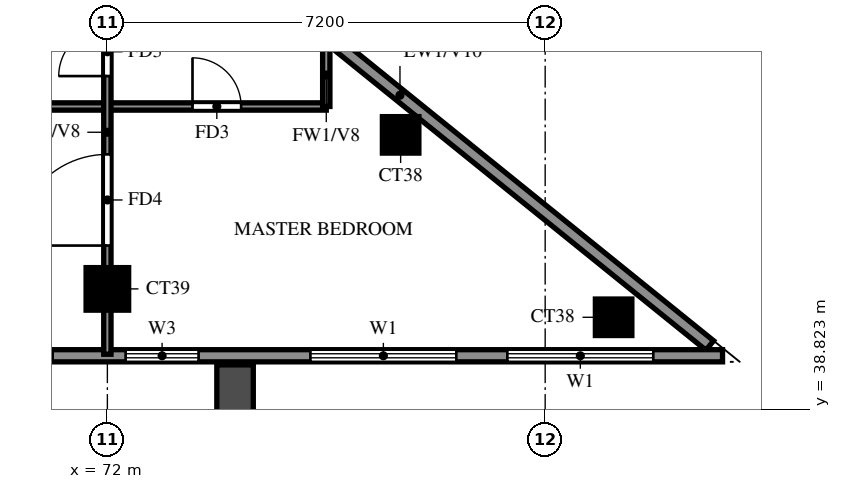
"""IFC4 building model, lengths in metres.
Left out: names, types, materials, properties, quantities, classifications, styles, units other than length and angle.
Written with IfcOpenShell. Run it as: python <this file> out.ifc"""

import sys

from ifc_helpers import new_model, si_unit, direction, frame, frame_2d, origin, origin_2d, place, context, subcontext, project, spatial, rectangle, extrude, source, transform, mapped, element, fill, save


model = new_model("IFC4")
c1 = context("Model", 3, precision=1e-05, world=origin(), true_north=direction((0.0, 1.0)))
c2 = subcontext(c1, "Body", "Model", "MODEL_VIEW")
j1 = project(units=[si_unit("LENGTHUNIT", "METRE"), si_unit("PLANEANGLEUNIT", "RADIAN")], contexts=[c1])
p1 = place(None, origin())
s1 = spatial("IfcSite", under=j1, at=p1, CompositionType="ELEMENT")
p2 = place(p1, origin())
s2 = spatial("IfcBuilding", under=s1, at=p2, CompositionType="ELEMENT")
p3 = place(p2, frame((0.0, 0.0, 267.5)))
s3 = spatial("IfcBuildingStorey", under=s2, at=p3, CompositionType="ELEMENT", Elevation=267.5)
m1 = source(origin(), c2, "Body", "SweptSolid", [
    extrude(rectangle(XDim=0.6, YDim=0.6, at=origin_2d()), origin(), (0.0, 0.0, 1.0), 3.099),
])
p4 = place(p3, frame((80.326, 40.333, 0.0), z_axis=(0.0, 0.0, 1.0), x_axis=(1.0, 0.0, 0.0)))
e1 = element("IfcColumn", 1, at=p4, inside=s3, PredefinedType="COLUMN", context=c2, shape_type="MappedRepresentation", body=[
    mapped(m1, transform((0.0, 0.0, 0.0))),
])
m2 = source(origin(), c2, "Body", "SweptSolid", [
    extrude(rectangle(XDim=0.7, YDim=0.7, at=origin_2d()), origin(), (0.0, 0.0, 1.0), 3.099),
])
p5 = place(p3, frame((72.0, 40.8, 0.0), z_axis=(0.0, 0.0, 1.0), x_axis=(1.0, 0.0, 0.0)))
e2 = element("IfcColumn", 2, at=p5, inside=s3, PredefinedType="COLUMN", context=c2, shape_type="MappedRepresentation", body=[
    mapped(m2, transform((0.0, 0.0, 0.0))),
])
p6 = place(p3, frame((76.823, 43.333, 0.0), z_axis=(0.0, 0.0, 1.0), x_axis=(1.0, 0.0, 0.0)))
e3 = element("IfcColumn", 3, at=p6, inside=s3, PredefinedType="COLUMN", context=c2, shape_type="MappedRepresentation", body=[
    mapped(m1, transform((0.0, 0.0, 0.0))),
])
p7 = place(p3, frame((81.907, 39.87, 0.0), z_axis=(0.0, 0.0, 1.0), x_axis=(-0.777936274417, 0.62834318087, 0.0)))
e4 = element("IfcWall", 4, at=p7, inside=s3, PredefinedType="SOLIDWALL", context=c2, shape_type="SweptSolid", body=[
    extrude(rectangle(XDim=13.099, YDim=0.2, at=frame_2d((6.549, 0.0))), origin(), (0.0, 0.0, 1.0), 3.099),
])
p8 = place(p7, frame((9.938, 0.0, 1.5)))
e5 = element("IfcOpeningElement", 5, at=p8, cuts=e4, PredefinedType="OPENING", context=c2, shape_type="SweptSolid", body=[
    extrude(rectangle(XDim=0.9, YDim=0.9, at=frame_2d((0.45, 0.45))), frame((0.0, 0.11, 0.0), z_axis=(0.0, -1.0, 0.0), x_axis=(1.0, 0.0, 0.0)), (0.0, 0.0, 1.0), 0.22),
])
p9 = place(p3, frame((58.8, 39.7, 0.0), z_axis=(0.0, 0.0, 1.0), x_axis=(1.0, 0.0, 0.0)))
e6 = element("IfcWall", 6, at=p9, inside=s3, PredefinedType="SOLIDWALL", context=c2, shape_type="SweptSolid", body=[
    extrude(rectangle(XDim=23.317, YDim=0.2, at=frame_2d((11.658, 0.0))), origin(), (0.0, 0.0, 1.0), 3.099),
])
p10 = place(p9, frame((10.5, 0.0, 0.0)))
e7 = element("IfcOpeningElement", 7, at=p10, cuts=e6, PredefinedType="OPENING", context=c2, shape_type="SweptSolid", body=[
    extrude(rectangle(XDim=1.8, YDim=2.4, at=frame_2d((0.9, 1.2))), frame((0.0, 0.11, 0.0), z_axis=(0.0, -1.0, 0.0), x_axis=(1.0, 0.0, 0.0)), (0.0, 0.0, 1.0), 0.22),
])
p11 = place(p9, frame((6.3, 0.0, 0.6)))
e8 = element("IfcOpeningElement", 8, at=p11, cuts=e6, PredefinedType="OPENING", context=c2, shape_type="SweptSolid", body=[
    extrude(rectangle(XDim=1.8, YDim=2.4, at=frame_2d((0.9, 1.2))), frame((0.0, 0.11, 0.0), z_axis=(0.0, -1.0, 0.0), x_axis=(1.0, 0.0, 0.0)), (0.0, 0.0, 1.0), 0.22),
])
p12 = place(p9, frame((9.15, 0.0, 0.6)))
e9 = element("IfcOpeningElement", 9, at=p12, cuts=e6, PredefinedType="OPENING", context=c2, shape_type="SweptSolid", body=[
    extrude(rectangle(XDim=0.9, YDim=2.4, at=frame_2d((0.45, 1.2))), frame((0.0, 0.11, 0.0), z_axis=(0.0, -1.0, 0.0), x_axis=(1.0, 0.0, 0.0)), (0.0, 0.0, 1.0), 0.22),
])
p13 = place(p9, frame((13.5, 0.0, 0.6)))
e10 = element("IfcOpeningElement", 10, at=p13, cuts=e6, PredefinedType="OPENING", context=c2, shape_type="SweptSolid", body=[
    extrude(rectangle(XDim=1.2, YDim=2.4, at=frame_2d((0.6, 1.2))), frame((0.0, 0.11, 0.0), z_axis=(0.0, -1.0, 0.0), x_axis=(1.0, 0.0, 0.0)), (0.0, 0.0, 1.0), 0.22),
])
p14 = place(p9, frame((16.539, 0.0, 0.6)))
e11 = element("IfcOpeningElement", 11, at=p14, cuts=e6, PredefinedType="OPENING", context=c2, shape_type="SweptSolid", body=[
    extrude(rectangle(XDim=2.4, YDim=2.4, at=frame_2d((1.2, 1.2))), frame((0.0, 0.11, 0.0), z_axis=(0.0, -1.0, 0.0), x_axis=(1.0, 0.0, 0.0)), (0.0, 0.0, 1.0), 0.22),
])
p15 = place(p9, frame((19.778, 0.0, 0.6)))
e12 = element("IfcOpeningElement", 12, at=p15, cuts=e6, PredefinedType="OPENING", context=c2, shape_type="SweptSolid", body=[
    extrude(rectangle(XDim=2.4, YDim=2.4, at=frame_2d((1.2, 1.2))), frame((0.0, 0.11, 0.0), z_axis=(0.0, -1.0, 0.0), x_axis=(1.0, 0.0, 0.0)), (0.0, 0.0, 1.0), 0.22),
])
p16 = place(p3, frame((74.1, 39.55, 0.0), z_axis=(0.0, 0.0, 1.0), x_axis=(0.0, -1.0, 0.0)))
e13 = element("IfcWall", 13, at=p16, inside=s3, PredefinedType="SOLIDWALL", context=c2, shape_type="SweptSolid", body=[
    extrude(rectangle(XDim=2.65, YDim=0.6, at=frame_2d((1.325, 0.0))), origin(), (0.0, 0.0, 1.0), 2.729),
])
p17 = place(p3, frame((60.0, 43.8, 0.0), z_axis=(0.0, 0.0, 1.0), x_axis=(1.0, 0.0, 0.0)))
e14 = element("IfcWall", 14, at=p17, inside=s3, PredefinedType="PARTITIONING", context=c2, shape_type="SweptSolid", body=[
    extrude(rectangle(XDim=15.6, YDim=0.12, at=frame_2d((7.8, 0.0))), origin(), (0.0, 0.0, 1.0), 3.099),
])
p18 = place(p17, frame((7.65, 0.0, 0.0)))
e15 = element("IfcOpeningElement", 15, at=p18, cuts=e14, PredefinedType="OPENING", context=c2, shape_type="SweptSolid", body=[
    extrude(rectangle(XDim=1.5, YDim=2.1, at=frame_2d((0.75, 1.05))), frame((0.0, 0.07, 0.0), z_axis=(0.0, -1.0, 0.0), x_axis=(1.0, 0.0, 0.0)), (0.0, 0.0, 1.0), 0.14),
])
p19 = place(p17, frame((1.95, 0.0, 0.0)))
e16 = element("IfcOpeningElement", 16, at=p19, cuts=e14, PredefinedType="OPENING", context=c2, shape_type="SweptSolid", body=[
    extrude(rectangle(XDim=0.9, YDim=2.1, at=frame_2d((0.45, 1.05))), frame((0.0, 0.07, 0.0), z_axis=(0.0, -1.0, 0.0), x_axis=(1.0, 0.0, 0.0)), (0.0, 0.0, 1.0), 0.14),
])
p20 = place(p17, frame((13.4, 0.0, 0.0)))
e17 = element("IfcOpeningElement", 17, at=p20, cuts=e14, PredefinedType="OPENING", context=c2, shape_type="SweptSolid", body=[
    extrude(rectangle(XDim=0.8, YDim=2.1, at=frame_2d((0.4, 1.05))), frame((0.0, 0.07, 0.0), z_axis=(0.0, -1.0, 0.0), x_axis=(1.0, 0.0, 0.0)), (0.0, 0.0, 1.0), 0.14),
])
p21 = place(p3, frame((72.0, 39.725, 0.0), z_axis=(0.0, 0.0, 1.0), x_axis=(0.0, 1.0, 0.0)))
e18 = element("IfcWall", 18, at=p21, inside=s3, PredefinedType="PARTITIONING", context=c2, shape_type="SweptSolid", body=[
    extrude(rectangle(XDim=8.114, YDim=0.12, at=frame_2d((4.057, 0.0))), origin(), (0.0, 0.0, 1.0), 3.099),
])
p22 = place(p21, frame((1.788, 0.0, 0.0)))
e19 = element("IfcOpeningElement", 19, at=p22, cuts=e18, PredefinedType="OPENING", context=c2, shape_type="SweptSolid", body=[
    extrude(rectangle(XDim=1.5, YDim=2.1, at=frame_2d((0.75, 1.05))), frame((0.0, 0.07, 0.0), z_axis=(0.0, -1.0, 0.0), x_axis=(1.0, 0.0, 0.0)), (0.0, 0.0, 1.0), 0.14),
])
p23 = place(p21, frame((4.575, 0.0, 0.0)))
e20 = element("IfcOpeningElement", 20, at=p23, cuts=e18, PredefinedType="OPENING", context=c2, shape_type="SweptSolid", body=[
    extrude(rectangle(XDim=0.8, YDim=2.1, at=frame_2d((0.4, 1.05))), frame((0.0, 0.07, 0.0), z_axis=(0.0, -1.0, 0.0), x_axis=(1.0, 0.0, 0.0)), (0.0, 0.0, 1.0), 0.14),
])
p24 = place(p3, frame((75.6, 43.8, 0.0), z_axis=(0.0, 0.0, 1.0), x_axis=(0.0, 1.0, 0.0)))
e21 = element("IfcWall", 21, at=p24, inside=s3, PredefinedType="PARTITIONING", context=c2, shape_type="SweptSolid", body=[
    extrude(rectangle(XDim=1.035, YDim=0.12, at=frame_2d((0.518, 0.0))), origin(), (0.0, 0.0, 1.0), 3.099),
])
p25 = place(p13, origin())
e22 = element("IfcWindow", 22, at=p25, inside=s3, PartitioningType="SINGLE_PANEL", PredefinedType="WINDOW", context=c2, shape_type="SweptSolid", body=[
    extrude(rectangle(XDim=1.2, YDim=2.4, at=frame_2d((0.6, 1.2))), frame((0.0, 0.03, 0.0), z_axis=(0.0, -1.0, 0.0), x_axis=(1.0, 0.0, 0.0)), (0.0, 0.0, 1.0), 0.06),
])
fill(e10, e22)
p26 = place(p14, origin())
e23 = element("IfcWindow", 23, at=p26, inside=s3, PartitioningType="DOUBLE_PANEL_VERTICAL", PredefinedType="WINDOW", context=c2, shape_type="SweptSolid", body=[
    extrude(rectangle(XDim=2.4, YDim=2.4, at=frame_2d((1.2, 1.2))), frame((0.0, 0.03, 0.0), z_axis=(0.0, -1.0, 0.0), x_axis=(1.0, 0.0, 0.0)), (0.0, 0.0, 1.0), 0.06),
])
fill(e11, e23)
p27 = place(p15, origin())
e24 = element("IfcWindow", 24, at=p27, inside=s3, PartitioningType="DOUBLE_PANEL_VERTICAL", PredefinedType="WINDOW", context=c2, shape_type="SweptSolid", body=[
    extrude(rectangle(XDim=2.4, YDim=2.4, at=frame_2d((1.2, 1.2))), frame((0.0, 0.03, 0.0), z_axis=(0.0, -1.0, 0.0), x_axis=(1.0, 0.0, 0.0)), (0.0, 0.0, 1.0), 0.06),
])
fill(e12, e24)
p28 = place(p22, origin())
e25 = element("IfcDoor", 25, at=p28, inside=s3, OperationType="SINGLE_SWING_LEFT", PredefinedType="DOOR", context=c2, shape_type="SweptSolid", body=[
    extrude(rectangle(XDim=1.5, YDim=2.1, at=frame_2d((0.75, 1.05))), frame((0.0, 0.025, 0.0), z_axis=(0.0, -1.0, 0.0), x_axis=(1.0, 0.0, 0.0)), (0.0, 0.0, 1.0), 0.05),
])
fill(e19, e25)
p29 = place(p23, origin())
e26 = element("IfcDoor", 26, at=p29, inside=s3, OperationType="SINGLE_SWING_LEFT", PredefinedType="DOOR", context=c2, shape_type="SweptSolid", body=[
    extrude(rectangle(XDim=0.8, YDim=2.1, at=frame_2d((0.4, 1.05))), frame((0.0, 0.025, 0.0), z_axis=(0.0, -1.0, 0.0), x_axis=(1.0, 0.0, 0.0)), (0.0, 0.0, 1.0), 0.05),
])
fill(e20, e26)
p30 = place(p20, origin())
e27 = element("IfcDoor", 27, at=p30, inside=s3, OperationType="SINGLE_SWING_LEFT", PredefinedType="DOOR", context=c2, shape_type="SweptSolid", body=[
    extrude(rectangle(XDim=0.8, YDim=2.1, at=frame_2d((0.4, 1.05))), frame((0.0, 0.025, 0.0), z_axis=(0.0, -1.0, 0.0), x_axis=(1.0, 0.0, 0.0)), (0.0, 0.0, 1.0), 0.05),
])
fill(e17, e27)
save(model, sys.argv[1])
